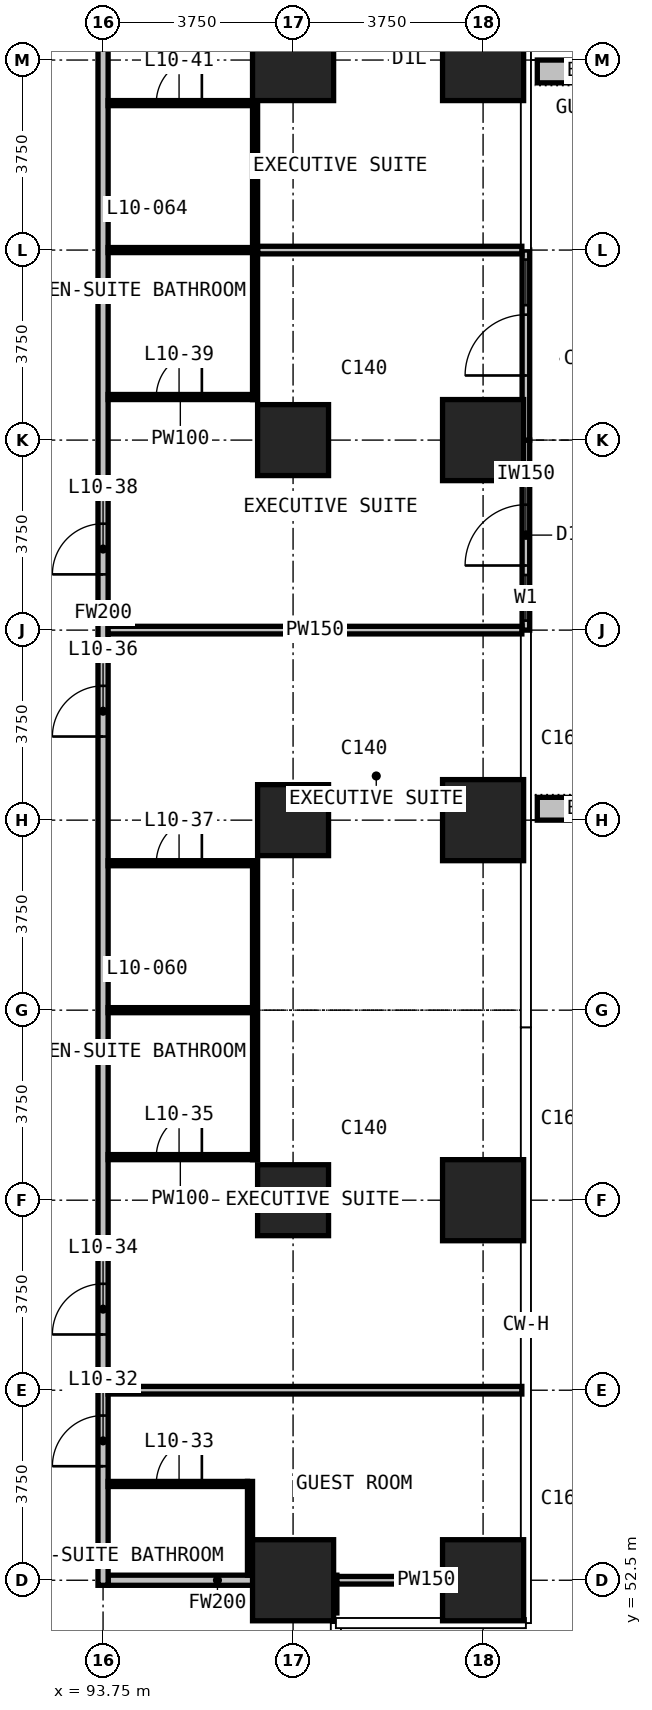
"""IFC4 building model, lengths in metres.
Left out: names, types, materials, properties, quantities, classifications, styles, units other than length and angle.
Written with IfcOpenShell. Run it as: python <this file> out.ifc"""

import sys

from ifc_helpers import new_model, si_unit, direction, frame, frame_2d, origin, origin_2d, place, context, subcontext, project, spatial, rectangle, extrude, element, fill, save


model = new_model("IFC4")
c1 = context("Model", 3, precision=1e-05, world=origin(), true_north=direction((0.0, 1.0)))
c2 = subcontext(c1, "Body", "Model", "MODEL_VIEW")
j1 = project(units=[si_unit("LENGTHUNIT", "METRE"), si_unit("PLANEANGLEUNIT", "RADIAN")], contexts=[c1])
p1 = place(None, origin())
s1 = spatial("IfcSite", under=j1, at=p1, CompositionType="ELEMENT")
p2 = place(p1, origin())
s2 = spatial("IfcBuilding", under=s1, at=p2, CompositionType="ELEMENT")
p3 = place(p2, frame((0.0, 0.0, 52.7)))
s3 = spatial("IfcBuildingStorey", under=s2, at=p3, CompositionType="ELEMENT", Elevation=52.7)
p4 = place(p3, frame((97.5, 52.5, 0.0), z_axis=(0.0, 0.0, 1.0), x_axis=(1.0, 0.0, 0.0)))
e1 = element("IfcColumn", 1, at=p4, inside=s3, PredefinedType="COLUMN", context=c2, shape_type="SweptSolid", body=[
    extrude(rectangle(XDim=1.6, YDim=1.6, at=origin_2d()), origin(), (0.0, 0.0, 1.0), 3.3),
])
for number, where, z_axis, x_axis in (
    (2, (97.5, 60.0, 0.0), (0.0, 0.0, 1.0), (1.0, 0.0, 0.0)),
    (3, (97.5, 67.5, 0.0), (0.0, 0.0, 1.0), (1.0, 0.0, 0.0)),
    (4, (97.5, 75.0, 0.0), (0.0, 0.0, 1.0), (1.0, 0.0, 0.0)),
):
    element("IfcColumn", number, at=place(p3, frame(where, z_axis=z_axis, x_axis=x_axis)), inside=s3, PredefinedType="COLUMN", context=c2, shape_type="SweptSolid", body=[
        extrude(rectangle(XDim=1.4, YDim=1.4, at=origin_2d()), origin(), (0.0, 0.0, 1.0), 3.3),
    ])
for number, where, z_axis, x_axis in (
    (5, (97.5, 82.5, 0.0), (0.0, 0.0, 1.0), (1.0, 0.0, 0.0)),
    (6, (101.25, 52.5, 0.0), (0.0, 0.0, 1.0), (1.0, 0.0, 0.0)),
    (7, (101.25, 60.0, 0.0), (0.0, 0.0, 1.0), (1.0, 0.0, 0.0)),
    (8, (101.25, 67.5, 0.0), (0.0, 0.0, 1.0), (1.0, 0.0, 0.0)),
    (9, (101.25, 75.0, 0.0), (0.0, 0.0, 1.0), (1.0, 0.0, 0.0)),
    (10, (101.25, 82.5, 0.0), (0.0, 0.0, 1.0), (1.0, 0.0, 0.0)),
):
    element("IfcColumn", number, at=place(p3, frame(where, z_axis=z_axis, x_axis=x_axis)), inside=s3, PredefinedType="COLUMN", context=c2, shape_type="SweptSolid", body=[
        extrude(rectangle(XDim=1.6, YDim=1.6, at=origin_2d()), origin(), (0.0, 0.0, 1.0), 3.3),
    ])
p5 = place(p3, frame((102.095, 71.25, 0.0), z_axis=(0.0, 0.0, 1.0), x_axis=(0.0, 1.0, 0.0)))
e11 = element("IfcWall", 11, at=p5, inside=s3, PredefinedType="SOLIDWALL", context=c2, shape_type="SweptSolid", body=[
    extrude(rectangle(XDim=3.75, YDim=0.15, at=frame_2d((1.875, 0.0))), origin(), (0.0, 0.0, 1.0), 3.0),
])
p6 = place(p5, frame((0.188, 0.0, 0.1)))
e12 = element("IfcOpeningElement", 12, at=p6, cuts=e11, PredefinedType="OPENING", context=c2, shape_type="SweptSolid", body=[
    extrude(rectangle(XDim=0.9, YDim=2.4, at=frame_2d((0.45, 1.2))), frame((0.0, 0.085, 0.0), z_axis=(0.0, -1.0, 0.0), x_axis=(1.0, 0.0, 0.0)), (0.0, 0.0, 1.0), 0.17),
])
p7 = place(p5, frame((1.275, 0.0, 0.0)))
e13 = element("IfcOpeningElement", 13, at=p7, cuts=e11, PredefinedType="OPENING", context=c2, shape_type="SweptSolid", body=[
    extrude(rectangle(XDim=1.2, YDim=2.4, at=frame_2d((0.6, 1.2))), frame((0.0, 0.085, 0.0), z_axis=(0.0, -1.0, 0.0), x_axis=(1.0, 0.0, 0.0)), (0.0, 0.0, 1.0), 0.17),
])
p8 = place(p3, frame((102.095, 75.0, 0.0), z_axis=(0.0, 0.0, 1.0), x_axis=(0.0, 1.0, 0.0)))
e14 = element("IfcWall", 14, at=p8, inside=s3, PredefinedType="SOLIDWALL", context=c2, shape_type="SweptSolid", body=[
    extrude(rectangle(XDim=3.75, YDim=0.15, at=frame_2d((1.875, 0.0))), origin(), (0.0, 0.0, 1.0), 3.0),
])
p9 = place(p8, frame((1.275, 0.0, 0.0)))
e15 = element("IfcOpeningElement", 15, at=p9, cuts=e14, PredefinedType="OPENING", context=c2, shape_type="SweptSolid", body=[
    extrude(rectangle(XDim=1.2, YDim=2.4, at=frame_2d((0.6, 1.2))), frame((0.0, 0.085, 0.0), z_axis=(0.0, -1.0, 0.0), x_axis=(1.0, 0.0, 0.0)), (0.0, 0.0, 1.0), 0.17),
])
p10 = place(p8, frame((2.663, 0.0, 0.1)))
e16 = element("IfcOpeningElement", 16, at=p10, cuts=e14, PredefinedType="OPENING", context=c2, shape_type="SweptSolid", body=[
    extrude(rectangle(XDim=0.9, YDim=2.4, at=frame_2d((0.45, 1.2))), frame((0.0, 0.085, 0.0), z_axis=(0.0, -1.0, 0.0), x_axis=(1.0, 0.0, 0.0)), (0.0, 0.0, 1.0), 0.17),
])
for number, where, z_axis, x_axis in (
    (17, (102.32, 67.725, 0.0), (0.0, 0.0, 1.0), (1.0, 0.0, 0.0)),
    (18, (102.32, 82.275, 0.0), (0.0, 0.0, 1.0), (1.0, 0.0, 0.0)),
):
    element("IfcWall", number, at=place(p3, frame(where, z_axis=z_axis, x_axis=x_axis)), inside=s3, PredefinedType="USERDEFINED", context=c2, shape_type="SweptSolid", body=[
        extrude(rectangle(XDim=2.33, YDim=0.45, at=frame_2d((1.165, 0.0))), origin(), (0.0, 0.0, 1.0), 1.1),
    ])
p11 = place(p3, frame((93.85, 52.5, 0.0), z_axis=(0.0, 0.0, 1.0), x_axis=(1.0, 0.0, 0.0)))
e19 = element("IfcWall", 19, at=p11, inside=s3, PredefinedType="PARTITIONING", context=c2, shape_type="SweptSolid", body=[
    extrude(rectangle(XDim=4.315, YDim=0.2, at=frame_2d((2.157, 0.0))), origin(), (0.0, 0.0, 1.0), 3.0),
])
p12 = place(p3, frame((93.75, 52.4, 0.0), z_axis=(0.0, 0.0, 1.0), x_axis=(0.0, 1.0, 0.0)))
e20 = element("IfcWall", 20, at=p12, inside=s3, PredefinedType="PARTITIONING", context=c2, shape_type="SweptSolid", body=[
    extrude(rectangle(XDim=38.365, YDim=0.2, at=frame_2d((19.183, 0.0))), origin(), (0.0, 0.0, 1.0), 3.0),
])
p13 = place(p12, frame((2.35, 0.0, 0.0)))
e21 = element("IfcOpeningElement", 21, at=p13, cuts=e20, PredefinedType="OPENING", context=c2, shape_type="SweptSolid", body=[
    extrude(rectangle(XDim=1.0, YDim=2.2, at=frame_2d((0.5, 1.1))), frame((0.0, 0.11, 0.0), z_axis=(0.0, -1.0, 0.0), x_axis=(1.0, 0.0, 0.0)), (0.0, 0.0, 1.0), 0.22),
])
p14 = place(p12, frame((4.95, 0.0, 0.0)))
e22 = element("IfcOpeningElement", 22, at=p14, cuts=e20, PredefinedType="OPENING", context=c2, shape_type="SweptSolid", body=[
    extrude(rectangle(XDim=1.0, YDim=2.2, at=frame_2d((0.5, 1.1))), frame((0.0, 0.11, 0.0), z_axis=(0.0, -1.0, 0.0), x_axis=(1.0, 0.0, 0.0)), (0.0, 0.0, 1.0), 0.22),
])
p15 = place(p12, frame((16.75, 0.0, 0.0)))
e23 = element("IfcOpeningElement", 23, at=p15, cuts=e20, PredefinedType="OPENING", context=c2, shape_type="SweptSolid", body=[
    extrude(rectangle(XDim=1.0, YDim=2.2, at=frame_2d((0.5, 1.1))), frame((0.0, 0.11, 0.0), z_axis=(0.0, -1.0, 0.0), x_axis=(1.0, 0.0, 0.0)), (0.0, 0.0, 1.0), 0.22),
])
p16 = place(p12, frame((19.95, 0.0, 0.0)))
e24 = element("IfcOpeningElement", 24, at=p16, cuts=e20, PredefinedType="OPENING", context=c2, shape_type="SweptSolid", body=[
    extrude(rectangle(XDim=1.0, YDim=2.2, at=frame_2d((0.5, 1.1))), frame((0.0, 0.11, 0.0), z_axis=(0.0, -1.0, 0.0), x_axis=(1.0, 0.0, 0.0)), (0.0, 0.0, 1.0), 0.22),
])
p17 = place(p12, frame((31.75, 0.0, 0.0)))
e25 = element("IfcOpeningElement", 25, at=p17, cuts=e20, PredefinedType="OPENING", context=c2, shape_type="SweptSolid", body=[
    extrude(rectangle(XDim=1.0, YDim=2.2, at=frame_2d((0.5, 1.1))), frame((0.0, 0.11, 0.0), z_axis=(0.0, -1.0, 0.0), x_axis=(1.0, 0.0, 0.0)), (0.0, 0.0, 1.0), 0.22),
])
p18 = place(p12, frame((35.65, 0.0, 0.0)))
e26 = element("IfcOpeningElement", 26, at=p18, cuts=e20, PredefinedType="OPENING", context=c2, shape_type="SweptSolid", body=[
    extrude(rectangle(XDim=0.9, YDim=2.2, at=frame_2d((0.45, 1.1))), frame((0.0, 0.11, 0.0), z_axis=(0.0, -1.0, 0.0), x_axis=(1.0, 0.0, 0.0)), (0.0, 0.0, 1.0), 0.22),
])
p19 = place(p3, frame((98.265, 51.855, 0.0), z_axis=(0.0, 0.0, 1.0), x_axis=(0.0, 1.0, 0.0)))
e27 = element("IfcWall", 27, at=p19, inside=s3, PredefinedType="PARTITIONING", context=c2, shape_type="SweptSolid", body=[
    extrude(rectangle(XDim=0.745, YDim=0.2, at=frame_2d((0.373, 0.0))), origin(), (0.0, 0.0, 1.0), 3.0),
])
p20 = place(p3, frame((98.365, 52.5, 0.0), z_axis=(0.0, 0.0, 1.0), x_axis=(1.0, 0.0, 0.0)))
e28 = element("IfcWall", 28, at=p20, inside=s3, PredefinedType="PARTITIONING", context=c2, shape_type="SweptSolid", body=[
    extrude(rectangle(XDim=3.53, YDim=0.15, at=frame_2d((1.765, 0.0))), origin(), (0.0, 0.0, 1.0), 3.0),
])
for number, where, z_axis, x_axis in (
    (29, (93.85, 56.25, 0.0), (0.0, 0.0, 1.0), (1.0, 0.0, 0.0)),
    (30, (93.85, 71.25, 0.0), (0.0, 0.0, 1.0), (1.0, 0.0, 0.0)),
):
    element("IfcWall", number, at=place(p3, frame(where, z_axis=z_axis, x_axis=x_axis)), inside=s3, PredefinedType="PARTITIONING", context=c2, shape_type="SweptSolid", body=[
        extrude(rectangle(XDim=8.165, YDim=0.15, at=frame_2d((4.083, 0.0))), origin(), (0.0, 0.0, 1.0), 3.0),
    ])
p21 = place(p3, frame((96.8, 78.75, 0.0), z_axis=(0.0, 0.0, 1.0), x_axis=(1.0, 0.0, 0.0)))
e31 = element("IfcWall", 31, at=p21, inside=s3, PredefinedType="PARTITIONING", context=c2, shape_type="SweptSolid", body=[
    extrude(rectangle(XDim=5.215, YDim=0.15, at=frame_2d((2.607, 0.0))), origin(), (0.0, 0.0, 1.0), 3.0),
])
p22 = place(p3, frame((93.85, 54.4, 0.0), z_axis=(0.0, 0.0, 1.0), x_axis=(1.0, 0.0, 0.0)))
e32 = element("IfcWall", 32, at=p22, inside=s3, PredefinedType="PARTITIONING", context=c2, shape_type="SweptSolid", body=[
    extrude(rectangle(XDim=2.75, YDim=0.1, at=frame_2d((1.375, 0.0))), origin(), (0.0, 0.0, 1.0), 3.0),
])
p23 = place(p22, frame((0.95, 0.0, 0.0)))
e33 = element("IfcOpeningElement", 33, at=p23, cuts=e32, PredefinedType="OPENING", context=c2, shape_type="SweptSolid", body=[
    extrude(rectangle(XDim=0.9, YDim=2.2, at=frame_2d((0.45, 1.1))), frame((0.0, 0.06, 0.0), z_axis=(0.0, -1.0, 0.0), x_axis=(1.0, 0.0, 0.0)), (0.0, 0.0, 1.0), 0.12),
])
p24 = place(p3, frame((93.85, 60.85, 0.0), z_axis=(0.0, 0.0, 1.0), x_axis=(1.0, 0.0, 0.0)))
e34 = element("IfcWall", 34, at=p24, inside=s3, PredefinedType="PARTITIONING", context=c2, shape_type="SweptSolid", body=[
    extrude(rectangle(XDim=2.85, YDim=0.1, at=frame_2d((1.425, 0.0))), origin(), (0.0, 0.0, 1.0), 3.0),
])
p25 = place(p24, frame((0.95, 0.0, 0.0)))
e35 = element("IfcOpeningElement", 35, at=p25, cuts=e34, PredefinedType="OPENING", context=c2, shape_type="SweptSolid", body=[
    extrude(rectangle(XDim=0.9, YDim=2.2, at=frame_2d((0.45, 1.1))), frame((0.0, 0.06, 0.0), z_axis=(0.0, -1.0, 0.0), x_axis=(1.0, 0.0, 0.0)), (0.0, 0.0, 1.0), 0.12),
])
p26 = place(p3, frame((93.85, 63.75, 0.0), z_axis=(0.0, 0.0, 1.0), x_axis=(1.0, 0.0, 0.0)))
e36 = element("IfcWall", 36, at=p26, inside=s3, PredefinedType="PARTITIONING", context=c2, shape_type="SweptSolid", body=[
    extrude(rectangle(XDim=2.85, YDim=0.1, at=frame_2d((1.425, 0.0))), origin(), (0.0, 0.0, 1.0), 3.0),
])
p27 = place(p3, frame((93.85, 66.65, 0.0), z_axis=(0.0, 0.0, 1.0), x_axis=(1.0, 0.0, 0.0)))
e37 = element("IfcWall", 37, at=p27, inside=s3, PredefinedType="PARTITIONING", context=c2, shape_type="SweptSolid", body=[
    extrude(rectangle(XDim=2.85, YDim=0.1, at=frame_2d((1.425, 0.0))), origin(), (0.0, 0.0, 1.0), 3.0),
])
p28 = place(p27, frame((0.95, 0.0, 0.0)))
e38 = element("IfcOpeningElement", 38, at=p28, cuts=e37, PredefinedType="OPENING", context=c2, shape_type="SweptSolid", body=[
    extrude(rectangle(XDim=0.9, YDim=2.2, at=frame_2d((0.45, 1.1))), frame((0.0, 0.06, 0.0), z_axis=(0.0, -1.0, 0.0), x_axis=(1.0, 0.0, 0.0)), (0.0, 0.0, 1.0), 0.12),
])
p29 = place(p3, frame((93.85, 75.85, 0.0), z_axis=(0.0, 0.0, 1.0), x_axis=(1.0, 0.0, 0.0)))
e39 = element("IfcWall", 39, at=p29, inside=s3, PredefinedType="PARTITIONING", context=c2, shape_type="SweptSolid", body=[
    extrude(rectangle(XDim=2.85, YDim=0.1, at=frame_2d((1.425, 0.0))), origin(), (0.0, 0.0, 1.0), 3.0),
])
p30 = place(p29, frame((0.95, 0.0, 0.0)))
e40 = element("IfcOpeningElement", 40, at=p30, cuts=e39, PredefinedType="OPENING", context=c2, shape_type="SweptSolid", body=[
    extrude(rectangle(XDim=0.9, YDim=2.2, at=frame_2d((0.45, 1.1))), frame((0.0, 0.06, 0.0), z_axis=(0.0, -1.0, 0.0), x_axis=(1.0, 0.0, 0.0)), (0.0, 0.0, 1.0), 0.12),
])
p31 = place(p3, frame((93.85, 78.75, 0.0), z_axis=(0.0, 0.0, 1.0), x_axis=(1.0, 0.0, 0.0)))
e41 = element("IfcWall", 41, at=p31, inside=s3, PredefinedType="PARTITIONING", context=c2, shape_type="SweptSolid", body=[
    extrude(rectangle(XDim=2.85, YDim=0.1, at=frame_2d((1.425, 0.0))), origin(), (0.0, 0.0, 1.0), 3.0),
])
p32 = place(p3, frame((93.85, 81.65, 0.0), z_axis=(0.0, 0.0, 1.0), x_axis=(1.0, 0.0, 0.0)))
e42 = element("IfcWall", 42, at=p32, inside=s3, PredefinedType="PARTITIONING", context=c2, shape_type="SweptSolid", body=[
    extrude(rectangle(XDim=2.85, YDim=0.1, at=frame_2d((1.425, 0.0))), origin(), (0.0, 0.0, 1.0), 3.0),
])
p33 = place(p32, frame((0.95, 0.0, 0.0)))
e43 = element("IfcOpeningElement", 43, at=p33, cuts=e42, PredefinedType="OPENING", context=c2, shape_type="SweptSolid", body=[
    extrude(rectangle(XDim=0.9, YDim=2.2, at=frame_2d((0.45, 1.1))), frame((0.0, 0.06, 0.0), z_axis=(0.0, -1.0, 0.0), x_axis=(1.0, 0.0, 0.0)), (0.0, 0.0, 1.0), 0.12),
])
p34 = place(p3, frame((96.65, 52.6, 0.0), z_axis=(0.0, 0.0, 1.0), x_axis=(0.0, 1.0, 0.0)))
e44 = element("IfcWall", 44, at=p34, inside=s3, PredefinedType="PARTITIONING", context=c2, shape_type="SweptSolid", body=[
    extrude(rectangle(XDim=1.85, YDim=0.1, at=frame_2d((0.925, 0.0))), origin(), (0.0, 0.0, 1.0), 3.0),
])
for number, where, z_axis, x_axis in (
    (45, (96.75, 60.8, 0.0), (0.0, 0.0, 1.0), (0.0, 1.0, 0.0)),
    (46, (96.75, 75.8, 0.0), (0.0, 0.0, 1.0), (0.0, 1.0, 0.0)),
):
    element("IfcWall", number, at=place(p3, frame(where, z_axis=z_axis, x_axis=x_axis)), inside=s3, PredefinedType="PARTITIONING", context=c2, shape_type="SweptSolid", body=[
        extrude(rectangle(XDim=5.9, YDim=0.1, at=frame_2d((2.95, 0.0))), origin(), (0.0, 0.0, 1.0), 3.0),
    ])
p35 = place(p6, origin())
e47 = element("IfcWindow", 47, at=p35, inside=s3, PartitioningType="SINGLE_PANEL", PredefinedType="WINDOW", context=c2, shape_type="SweptSolid", body=[
    extrude(rectangle(XDim=0.9, YDim=2.4, at=frame_2d((0.45, 1.2))), frame((0.0, 0.03, 0.0), z_axis=(0.0, -1.0, 0.0), x_axis=(1.0, 0.0, 0.0)), (0.0, 0.0, 1.0), 0.06),
])
fill(e12, e47)
p36 = place(p7, origin())
e48 = element("IfcDoor", 48, at=p36, inside=s3, OperationType="SINGLE_SWING_LEFT", PredefinedType="DOOR", context=c2, shape_type="SweptSolid", body=[
    extrude(rectangle(XDim=1.2, YDim=2.4, at=frame_2d((0.6, 1.2))), frame((0.0, 0.025, 0.0), z_axis=(0.0, -1.0, 0.0), x_axis=(1.0, 0.0, 0.0)), (0.0, 0.0, 1.0), 0.05),
])
fill(e13, e48)
p37 = place(p9, origin())
e49 = element("IfcDoor", 49, at=p37, inside=s3, OperationType="SINGLE_SWING_LEFT", PredefinedType="DOOR", context=c2, shape_type="SweptSolid", body=[
    extrude(rectangle(XDim=1.2, YDim=2.4, at=frame_2d((0.6, 1.2))), frame((0.0, 0.025, 0.0), z_axis=(0.0, -1.0, 0.0), x_axis=(1.0, 0.0, 0.0)), (0.0, 0.0, 1.0), 0.05),
])
fill(e15, e49)
p38 = place(p10, origin())
e50 = element("IfcWindow", 50, at=p38, inside=s3, PartitioningType="SINGLE_PANEL", PredefinedType="WINDOW", context=c2, shape_type="SweptSolid", body=[
    extrude(rectangle(XDim=0.9, YDim=2.4, at=frame_2d((0.45, 1.2))), frame((0.0, 0.03, 0.0), z_axis=(0.0, -1.0, 0.0), x_axis=(1.0, 0.0, 0.0)), (0.0, 0.0, 1.0), 0.06),
])
fill(e16, e50)
p39 = place(p13, origin())
e51 = element("IfcDoor", 51, at=p39, inside=s3, OperationType="SINGLE_SWING_RIGHT", PredefinedType="DOOR", context=c2, shape_type="SweptSolid", body=[
    extrude(rectangle(XDim=1.0, YDim=2.2, at=frame_2d((0.5, 1.1))), frame((0.0, 0.025, 0.0), z_axis=(0.0, -1.0, 0.0), x_axis=(1.0, 0.0, 0.0)), (0.0, 0.0, 1.0), 0.05),
])
fill(e21, e51)
p40 = place(p23, origin())
e52 = element("IfcDoor", 52, at=p40, inside=s3, OperationType="SINGLE_SWING_RIGHT", PredefinedType="DOOR", context=c2, shape_type="SweptSolid", body=[
    extrude(rectangle(XDim=0.9, YDim=2.2, at=frame_2d((0.45, 1.1))), frame((0.0, 0.025, 0.0), z_axis=(0.0, -1.0, 0.0), x_axis=(1.0, 0.0, 0.0)), (0.0, 0.0, 1.0), 0.05),
])
fill(e33, e52)
p41 = place(p14, origin())
e53 = element("IfcDoor", 53, at=p41, inside=s3, OperationType="SINGLE_SWING_LEFT", PredefinedType="DOOR", context=c2, shape_type="SweptSolid", body=[
    extrude(rectangle(XDim=1.0, YDim=2.2, at=frame_2d((0.5, 1.1))), frame((0.0, 0.025, 0.0), z_axis=(0.0, -1.0, 0.0), x_axis=(1.0, 0.0, 0.0)), (0.0, 0.0, 1.0), 0.05),
])
fill(e22, e53)
p42 = place(p25, origin())
e54 = element("IfcDoor", 54, at=p42, inside=s3, OperationType="SINGLE_SWING_RIGHT", PredefinedType="DOOR", context=c2, shape_type="SweptSolid", body=[
    extrude(rectangle(XDim=0.9, YDim=2.2, at=frame_2d((0.45, 1.1))), frame((0.0, 0.025, 0.0), z_axis=(0.0, -1.0, 0.0), x_axis=(1.0, 0.0, 0.0)), (0.0, 0.0, 1.0), 0.05),
])
fill(e35, e54)
p43 = place(p15, origin())
e55 = element("IfcDoor", 55, at=p43, inside=s3, OperationType="SINGLE_SWING_LEFT", PredefinedType="DOOR", context=c2, shape_type="SweptSolid", body=[
    extrude(rectangle(XDim=1.0, YDim=2.2, at=frame_2d((0.5, 1.1))), frame((0.0, 0.025, 0.0), z_axis=(0.0, -1.0, 0.0), x_axis=(1.0, 0.0, 0.0)), (0.0, 0.0, 1.0), 0.05),
])
fill(e23, e55)
p44 = place(p28, origin())
e56 = element("IfcDoor", 56, at=p44, inside=s3, OperationType="SINGLE_SWING_RIGHT", PredefinedType="DOOR", context=c2, shape_type="SweptSolid", body=[
    extrude(rectangle(XDim=0.9, YDim=2.2, at=frame_2d((0.45, 1.1))), frame((0.0, 0.025, 0.0), z_axis=(0.0, -1.0, 0.0), x_axis=(1.0, 0.0, 0.0)), (0.0, 0.0, 1.0), 0.05),
])
fill(e38, e56)
p45 = place(p16, origin())
e57 = element("IfcDoor", 57, at=p45, inside=s3, OperationType="SINGLE_SWING_LEFT", PredefinedType="DOOR", context=c2, shape_type="SweptSolid", body=[
    extrude(rectangle(XDim=1.0, YDim=2.2, at=frame_2d((0.5, 1.1))), frame((0.0, 0.025, 0.0), z_axis=(0.0, -1.0, 0.0), x_axis=(1.0, 0.0, 0.0)), (0.0, 0.0, 1.0), 0.05),
])
fill(e24, e57)
p46 = place(p30, origin())
e58 = element("IfcDoor", 58, at=p46, inside=s3, OperationType="SINGLE_SWING_RIGHT", PredefinedType="DOOR", context=c2, shape_type="SweptSolid", body=[
    extrude(rectangle(XDim=0.9, YDim=2.2, at=frame_2d((0.45, 1.1))), frame((0.0, 0.025, 0.0), z_axis=(0.0, -1.0, 0.0), x_axis=(1.0, 0.0, 0.0)), (0.0, 0.0, 1.0), 0.05),
])
fill(e40, e58)
p47 = place(p33, origin())
e59 = element("IfcDoor", 59, at=p47, inside=s3, OperationType="SINGLE_SWING_RIGHT", PredefinedType="DOOR", context=c2, shape_type="SweptSolid", body=[
    extrude(rectangle(XDim=0.9, YDim=2.2, at=frame_2d((0.45, 1.1))), frame((0.0, 0.025, 0.0), z_axis=(0.0, -1.0, 0.0), x_axis=(1.0, 0.0, 0.0)), (0.0, 0.0, 1.0), 0.05),
])
fill(e43, e59)
save(model, sys.argv[1])
